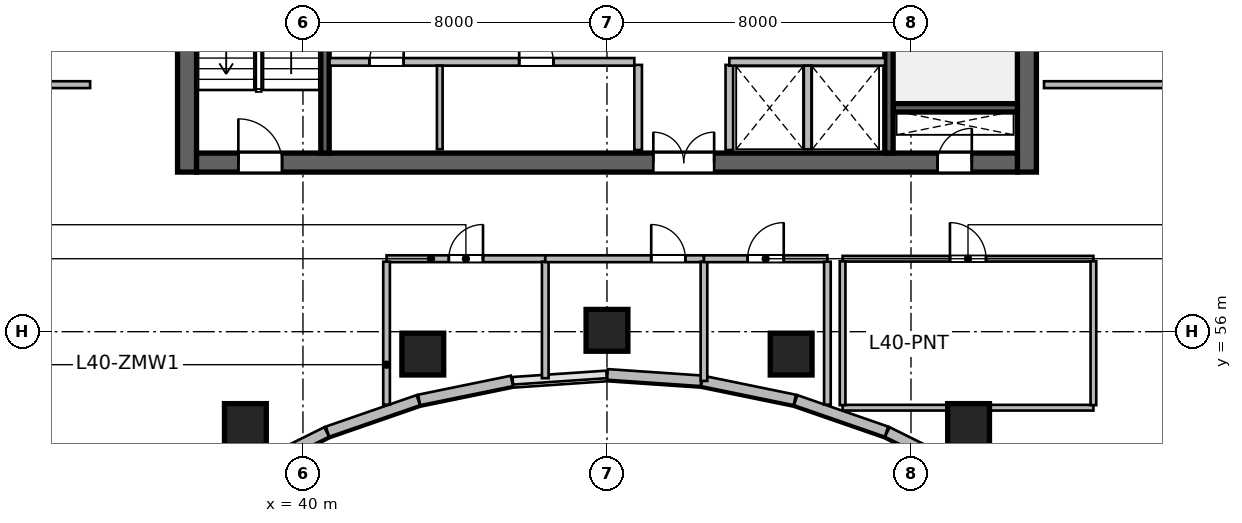
"""IFC4 building model, lengths in metres.
Left out: names, types, materials, properties, quantities, classifications, styles, units other than length and angle.
Written with IfcOpenShell. Run it as: python <this file> out.ifc"""

import sys

from ifc_helpers import new_model, si_unit, direction, frame, frame_2d, origin, origin_2d, place, context, subcontext, project, spatial, rectangle, circle, extrude, source, transform, mapped, element, fill, save


model = new_model("IFC4")
c1 = context("Model", 3, precision=1e-05, world=origin(), true_north=direction((0.0, 1.0)))
c2 = subcontext(c1, "Body", "Model", "MODEL_VIEW")
j1 = project(units=[si_unit("LENGTHUNIT", "METRE"), si_unit("PLANEANGLEUNIT", "RADIAN")], contexts=[c1])
p1 = place(None, origin())
s1 = spatial("IfcSite", under=j1, at=p1, CompositionType="ELEMENT")
p2 = place(p1, origin())
s2 = spatial("IfcBuilding", under=s1, at=p2, CompositionType="ELEMENT")
p3 = place(p2, frame((0.0, 0.0, 166.2)))
s3 = spatial("IfcBuildingStorey", under=s2, at=p3, CompositionType="ELEMENT", Elevation=166.2)
m1 = source(origin(), c2, "Body", "SweptSolid", [
    extrude(rectangle(XDim=12.0, YDim=0.5, at=frame_2d((6.0, 0.0))), origin(), (0.0, 0.0, 1.0), 3.9),
])
for number, where, z_axis, x_axis in (
    (1, (36.95, 60.2, 0.0), (0.0, 0.0, 1.0), (0.0, 1.0, 0.0)),
    (2, (59.05, 60.2, 0.0), (0.0, 0.0, 1.0), (0.0, 1.0, 0.0)),
):
    element("IfcWall", number, at=place(p3, frame(where, z_axis=z_axis, x_axis=x_axis)), inside=s3, PredefinedType="SHEAR", context=c2, shape_type="MappedRepresentation", body=[
        mapped(m1, transform((0.0, 0.0, 0.0), scale=1.0)),
    ])
m2 = source(origin(), c2, "Body", "SweptSolid", [
    extrude(rectangle(XDim=21.6, YDim=0.5, at=frame_2d((10.8, 0.0))), origin(), (0.0, 0.0, 1.0), 3.9),
])
p4 = place(p3, frame((37.2, 60.45, 0.0), z_axis=(0.0, 0.0, 1.0), x_axis=(1.0, 0.0, 0.0)))
e3 = element("IfcWall", 3, at=p4, inside=s3, PredefinedType="SHEAR", context=c2, shape_type="MappedRepresentation", body=[
    mapped(m2, transform((0.0, 0.0, 0.0), scale=1.0)),
])
p5 = place(p4, frame((1.1, 0.0, 0.0)))
e4 = element("IfcOpeningElement", 4, at=p5, cuts=e3, PredefinedType="OPENING", context=c2, shape_type="SweptSolid", body=[
    extrude(rectangle(XDim=1.15, YDim=2.15, at=frame_2d((0.575, 1.075))), frame((0.0, 0.26, 0.0), z_axis=(0.0, -1.0, 0.0), x_axis=(1.0, 0.0, 0.0)), (0.0, 0.0, 1.0), 0.52),
])
p6 = place(p4, frame((19.5, 0.0, 0.0)))
e5 = element("IfcOpeningElement", 5, at=p6, cuts=e3, PredefinedType="OPENING", context=c2, shape_type="SweptSolid", body=[
    extrude(rectangle(XDim=0.9, YDim=2.1, at=frame_2d((0.45, 1.05))), frame((0.0, 0.26, 0.0), z_axis=(0.0, -1.0, 0.0), x_axis=(1.0, 0.0, 0.0)), (0.0, 0.0, 1.0), 0.52),
])
p7 = place(p4, frame((12.02, 0.0, 0.0)))
e6 = element("IfcOpeningElement", 6, at=p7, cuts=e3, PredefinedType="OPENING", context=c2, shape_type="SweptSolid", body=[
    extrude(rectangle(XDim=1.6, YDim=2.15, at=frame_2d((0.8, 1.075))), frame((0.0, 0.26, 0.0), z_axis=(0.0, -1.0, 0.0), x_axis=(1.0, 0.0, 0.0)), (0.0, 0.0, 1.0), 0.52),
])
m3 = source(origin(), c2, "Body", "SweptSolid", [
    extrude(rectangle(XDim=3.27, YDim=0.22, at=frame_2d((1.635, 0.0))), origin(), (0.0, 0.0, 1.0), 3.9),
])
p8 = place(p3, frame((55.53, 61.89, 0.0), z_axis=(0.0, 0.0, 1.0), x_axis=(1.0, 0.0, 0.0)))
e7 = element("IfcWall", 7, at=p8, inside=s3, PredefinedType="SHEAR", context=c2, shape_type="MappedRepresentation", body=[
    mapped(m3, transform((0.0, 0.0, 0.0), scale=1.0)),
])
m4 = source(origin(), c2, "Body", "SweptSolid", [
    extrude(rectangle(XDim=11.0, YDim=0.22, at=frame_2d((5.5, 0.0))), origin(), (0.0, 0.0, 1.0), 3.9),
])
p9 = place(p3, frame((40.58, 60.7, 0.0), z_axis=(0.0, 0.0, 1.0), x_axis=(0.0, 1.0, 0.0)))
e8 = element("IfcWall", 8, at=p9, inside=s3, PredefinedType="SHEAR", context=c2, shape_type="MappedRepresentation", body=[
    mapped(m4, transform((0.0, 0.0, 0.0), scale=1.0)),
])
p10 = place(p3, frame((55.42, 60.7, 0.0), z_axis=(0.0, 0.0, 1.0), x_axis=(0.0, 1.0, 0.0)))
e9 = element("IfcWall", 9, at=p10, inside=s3, PredefinedType="SHEAR", context=c2, shape_type="MappedRepresentation", body=[
    mapped(m4, transform((0.0, 0.0, 0.0), scale=1.0)),
])
p11 = place(p10, frame((9.545, 0.0, 0.0)))
e10 = element("IfcOpeningElement", 10, at=p11, cuts=e9, PredefinedType="OPENING", context=c2, shape_type="SweptSolid", body=[
    extrude(rectangle(XDim=1.15, YDim=2.15, at=frame_2d((0.575, 1.075))), frame((0.0, 0.12, 0.0), z_axis=(0.0, -1.0, 0.0), x_axis=(1.0, 0.0, 0.0)), (0.0, 0.0, 1.0), 0.24),
])
m5 = source(origin(), c2, "Body", "SweptSolid", [
    extrude(circle(Radius=0.55, at=origin_2d()), origin(), (0.0, 0.0, 1.0), 3.9),
])
for number, where, z_axis, x_axis in (
    (11, (38.485, 53.558, 0.0), (0.0, 0.0, 1.0), (-0.289, 0.957, 0.0)),
    (12, (43.154, 55.411, 0.0), (0.0, 0.0, 1.0), (-0.143, 0.99, 0.0)),
    (13, (48.0, 56.036, 0.0), (0.0, 0.0, 1.0), (0.0, 1.0, 0.0)),
    (14, (52.846, 55.411, 0.0), (0.0, 0.0, 1.0), (0.143, 0.99, 0.0)),
    (15, (57.515, 53.558, 0.0), (0.0, 0.0, 1.0), (0.289, 0.957, 0.0)),
):
    element("IfcColumn", number, at=place(p3, frame(where, z_axis=z_axis, x_axis=x_axis)), inside=s3, PredefinedType="COLUMN", context=c2, shape_type="MappedRepresentation", body=[
        mapped(m5, transform((0.0, 0.0, 0.0), scale=1.0)),
    ])
m6 = source(origin(), c2, "Body", "SweptSolid", [
    extrude(rectangle(XDim=2.584, YDim=0.28, at=frame_2d((1.292, 0.0))), origin(), (0.0, 0.0, 1.0), 3.65),
])
p12 = place(p3, frame((57.692, 52.213, 0.0), z_axis=(0.0, 0.0, 1.0), x_axis=(-0.895989792847, 0.44407464588, 0.0)))
e16 = element("IfcWall", 16, at=p12, inside=s3, PredefinedType="SOLIDWALL", context=c2, shape_type="MappedRepresentation", body=[
    mapped(m6, transform((0.0, 0.0, 0.0), scale=1.0)),
])
m7 = source(origin(), c2, "Body", "SweptSolid", [
    extrude(rectangle(XDim=2.53, YDim=0.28, at=frame_2d((1.265, 0.0))), origin(), (0.0, 0.0, 1.0), 3.65),
])
p13 = place(p3, frame((55.355, 53.37, 0.0), z_axis=(0.0, 0.0, 1.0), x_axis=(-0.944872429646, 0.327438683872, 0.0)))
e17 = element("IfcWall", 17, at=p13, inside=s3, PredefinedType="SOLIDWALL", context=c2, shape_type="MappedRepresentation", body=[
    mapped(m7, transform((0.0, 0.0, 0.0), scale=1.0)),
])
m8 = source(origin(), c2, "Body", "SweptSolid", [
    extrude(rectangle(XDim=2.491, YDim=0.28, at=frame_2d((1.246, 0.0))), origin(), (0.0, 0.0, 1.0), 3.65),
])
p14 = place(p3, frame((52.942, 54.205, 0.0), z_axis=(0.0, 0.0, 1.0), x_axis=(-0.979630885979, 0.200806691214, 0.0)))
e18 = element("IfcWall", 18, at=p14, inside=s3, PredefinedType="SOLIDWALL", context=c2, shape_type="MappedRepresentation", body=[
    mapped(m8, transform((0.0, 0.0, 0.0), scale=1.0)),
])
m9 = source(origin(), c2, "Body", "SweptSolid", [
    extrude(rectangle(XDim=2.471, YDim=0.28, at=frame_2d((1.236, 0.0))), origin(), (0.0, 0.0, 1.0), 3.65),
])
p15 = place(p3, frame((50.478, 54.708, 0.0), z_axis=(0.0, 0.0, 1.0), x_axis=(-0.997708006929, 0.067666335123, 0.0)))
e19 = element("IfcWall", 19, at=p15, inside=s3, PredefinedType="SOLIDWALL", context=c2, shape_type="MappedRepresentation", body=[
    mapped(m9, transform((0.0, 0.0, 0.0), scale=1.0)),
])
p16 = place(p3, frame((45.498, 54.705, 0.0), z_axis=(0.0, 0.0, 1.0), x_axis=(-0.979630885979, -0.200806691214, 0.0)))
e20 = element("IfcWall", 20, at=p16, inside=s3, PredefinedType="SOLIDWALL", context=c2, shape_type="MappedRepresentation", body=[
    mapped(m8, transform((0.0, 0.0, 0.0), scale=1.0)),
])
p17 = place(p3, frame((43.035, 54.198, 0.0), z_axis=(0.0, 0.0, 1.0), x_axis=(-0.944872429646, -0.327438683872, 0.0)))
e21 = element("IfcWall", 21, at=p17, inside=s3, PredefinedType="SOLIDWALL", context=c2, shape_type="MappedRepresentation", body=[
    mapped(m7, transform((0.0, 0.0, 0.0), scale=1.0)),
])
p18 = place(p3, frame((40.624, 53.361, 0.0), z_axis=(0.0, 0.0, 1.0), x_axis=(-0.895989792847, -0.44407464588, 0.0)))
e22 = element("IfcWall", 22, at=p18, inside=s3, PredefinedType="SOLIDWALL", context=c2, shape_type="MappedRepresentation", body=[
    mapped(m6, transform((0.0, 0.0, 0.0), scale=1.0)),
])
m10 = source(origin(), c2, "Body", "SweptSolid", [
    extrude(rectangle(XDim=2.24, YDim=0.2, at=frame_2d((1.12, 0.0))), origin(), (0.0, 0.0, 1.0), 3.65),
])
for number, where, z_axis, x_axis in (
    (23, (48.82, 60.78, 0.0), (0.0, 0.0, 1.0), (0.0, 1.0, 0.0)),
    (24, (51.22, 60.78, 0.0), (0.0, 0.0, 1.0), (0.0, 1.0, 0.0)),
):
    element("IfcWall", number, at=place(p3, frame(where, z_axis=z_axis, x_axis=x_axis)), inside=s3, PredefinedType="SOLIDWALL", context=c2, shape_type="MappedRepresentation", body=[
        mapped(m10, transform((0.0, 0.0, 0.0), scale=1.0)),
    ])
m11 = source(origin(), c2, "Body", "SweptSolid", [
    extrude(rectangle(XDim=8.02, YDim=0.2, at=frame_2d((4.01, 0.0))), origin(), (0.0, 0.0, 1.0), 3.65),
])
p19 = place(p3, frame((40.7, 63.1, 0.0), z_axis=(0.0, 0.0, 1.0), x_axis=(1.0, 0.0, 0.0)))
e25 = element("IfcWall", 25, at=p19, inside=s3, PredefinedType="SOLIDWALL", context=c2, shape_type="MappedRepresentation", body=[
    mapped(m11, transform((0.0, 0.0, 0.0), scale=1.0)),
])
p20 = place(p19, frame((1.05, 0.0, 0.0)))
e26 = element("IfcOpeningElement", 26, at=p20, cuts=e25, PredefinedType="OPENING", context=c2, shape_type="SweptSolid", body=[
    extrude(rectangle(XDim=0.9, YDim=2.1, at=frame_2d((0.45, 1.05))), frame((0.0, 0.11, 0.0), z_axis=(0.0, -1.0, 0.0), x_axis=(1.0, 0.0, 0.0)), (0.0, 0.0, 1.0), 0.22),
])
p21 = place(p19, frame((4.99, 0.0, 0.0)))
e27 = element("IfcOpeningElement", 27, at=p21, cuts=e25, PredefinedType="OPENING", context=c2, shape_type="SweptSolid", body=[
    extrude(rectangle(XDim=0.9, YDim=2.1, at=frame_2d((0.45, 1.05))), frame((0.0, 0.11, 0.0), z_axis=(0.0, -1.0, 0.0), x_axis=(1.0, 0.0, 0.0)), (0.0, 0.0, 1.0), 0.22),
])
m12 = source(origin(), c2, "Body", "SweptSolid", [
    extrude(rectangle(XDim=4.1, YDim=0.2, at=frame_2d((2.05, 0.0))), origin(), (0.0, 0.0, 1.0), 3.65),
])
p22 = place(p3, frame((51.22, 63.1, 0.0), z_axis=(0.0, 0.0, 1.0), x_axis=(1.0, 0.0, 0.0)))
e28 = element("IfcWall", 28, at=p22, inside=s3, PredefinedType="SOLIDWALL", context=c2, shape_type="MappedRepresentation", body=[
    mapped(m12, transform((0.0, 0.0, 0.0), scale=1.0)),
])
m13 = source(origin(), c2, "Body", "SweptSolid", [
    extrude(rectangle(XDim=2.2, YDim=0.15, at=frame_2d((1.1, 0.0))), origin(), (0.0, 0.0, 1.0), 3.65),
])
p23 = place(p3, frame((43.6, 60.8, 0.0), z_axis=(0.0, 0.0, 1.0), x_axis=(0.0, 1.0, 0.0)))
e29 = element("IfcWall", 29, at=p23, inside=s3, PredefinedType="PARTITIONING", context=c2, shape_type="MappedRepresentation", body=[
    mapped(m13, transform((0.0, 0.0, 0.0), scale=1.0)),
])
m14 = source(origin(), c2, "Body", "SweptSolid", [
    extrude(rectangle(XDim=2.2, YDim=0.2, at=frame_2d((1.1, 0.0))), origin(), (0.0, 0.0, 1.0), 3.65),
])
p24 = place(p3, frame((53.28, 60.8, 0.0), z_axis=(0.0, 0.0, 1.0), x_axis=(0.0, 1.0, 0.0)))
e30 = element("IfcWall", 30, at=p24, inside=s3, PredefinedType="SOLIDWALL", context=c2, shape_type="MappedRepresentation", body=[
    mapped(m14, transform((0.0, 0.0, 0.0), scale=1.0)),
])
m15 = source(origin(), c2, "Body", "SweptSolid", [
    extrude(rectangle(XDim=4.176, YDim=0.18, at=frame_2d((2.088, 0.0))), origin(), (0.0, 0.0, 1.0), 3.65),
])
p25 = place(p3, frame((42.2, 57.92, 0.0), z_axis=(0.0, 0.0, 1.0), x_axis=(1.0, 0.0, 0.0)))
e31 = element("IfcWall", 31, at=p25, inside=s3, PredefinedType="PLUMBINGWALL", context=c2, shape_type="MappedRepresentation", body=[
    mapped(m15, transform((0.0, 0.0, 0.0), scale=1.0)),
])
p26 = place(p25, frame((1.638, 0.0, 0.0)))
e32 = element("IfcOpeningElement", 32, at=p26, cuts=e31, PredefinedType="OPENING", context=c2, shape_type="SweptSolid", body=[
    extrude(rectangle(XDim=0.9, YDim=2.08, at=frame_2d((0.45, 1.04))), frame((0.0, 0.1, 0.0), z_axis=(0.0, -1.0, 0.0), x_axis=(1.0, 0.0, 0.0)), (0.0, 0.0, 1.0), 0.2),
])
m16 = source(origin(), c2, "Body", "SweptSolid", [
    extrude(rectangle(XDim=3.763, YDim=0.175, at=frame_2d((1.881, 0.0))), origin(), (0.0, 0.0, 1.0), 3.65),
])
p27 = place(p3, frame((42.2, 54.079, 0.0), z_axis=(0.0, 0.0, 1.0), x_axis=(0.0, 1.0, 0.0)))
e33 = element("IfcWall", 33, at=p27, inside=s3, PredefinedType="PARTITIONING", context=c2, shape_type="MappedRepresentation", body=[
    mapped(m16, transform((0.0, 0.0, 0.0), scale=1.0)),
])
m17 = source(origin(), c2, "Body", "SweptSolid", [
    extrude(rectangle(XDim=3.065, YDim=0.175, at=frame_2d((1.533, 0.0))), origin(), (0.0, 0.0, 1.0), 3.65),
])
p28 = place(p3, frame((46.376, 54.776, 0.0), z_axis=(0.0, 0.0, 1.0), x_axis=(0.0, 1.0, 0.0)))
e34 = element("IfcWall", 34, at=p28, inside=s3, PredefinedType="PARTITIONING", context=c2, shape_type="MappedRepresentation", body=[
    mapped(m17, transform((0.0, 0.0, 0.0), scale=1.0)),
])
p29 = place(p3, frame((46.376, 57.92, 0.0), z_axis=(0.0, 0.0, 1.0), x_axis=(1.0, 0.0, 0.0)))
e35 = element("IfcWall", 35, at=p29, inside=s3, PredefinedType="PLUMBINGWALL", context=c2, shape_type="MappedRepresentation", body=[
    mapped(m15, transform((0.0, 0.0, 0.0), scale=1.0)),
])
p30 = place(p29, frame((2.788, 0.0, 0.0)))
e36 = element("IfcOpeningElement", 36, at=p30, cuts=e35, PredefinedType="OPENING", context=c2, shape_type="SweptSolid", body=[
    extrude(rectangle(XDim=0.9, YDim=2.08, at=frame_2d((0.45, 1.04))), frame((0.0, 0.1, 0.0), z_axis=(0.0, -1.0, 0.0), x_axis=(1.0, 0.0, 0.0)), (0.0, 0.0, 1.0), 0.2),
])
m18 = source(origin(), c2, "Body", "SweptSolid", [
    extrude(rectangle(XDim=3.136, YDim=0.175, at=frame_2d((1.568, 0.0))), origin(), (0.0, 0.0, 1.0), 3.65),
])
p31 = place(p3, frame((50.552, 54.705, 0.0), z_axis=(0.0, 0.0, 1.0), x_axis=(0.0, 1.0, 0.0)))
e37 = element("IfcWall", 37, at=p31, inside=s3, PredefinedType="PARTITIONING", context=c2, shape_type="MappedRepresentation", body=[
    mapped(m18, transform((0.0, 0.0, 0.0), scale=1.0)),
])
m19 = source(origin(), c2, "Body", "SweptSolid", [
    extrude(rectangle(XDim=3.248, YDim=0.18, at=frame_2d((1.624, 0.0))), origin(), (0.0, 0.0, 1.0), 3.65),
])
p32 = place(p3, frame((50.552, 57.92, 0.0), z_axis=(0.0, 0.0, 1.0), x_axis=(1.0, 0.0, 0.0)))
e38 = element("IfcWall", 38, at=p32, inside=s3, PredefinedType="PLUMBINGWALL", context=c2, shape_type="MappedRepresentation", body=[
    mapped(m19, transform((0.0, 0.0, 0.0), scale=1.0)),
])
p33 = place(p32, frame((1.149, 0.0, 0.0)))
e39 = element("IfcOpeningElement", 39, at=p33, cuts=e38, PredefinedType="OPENING", context=c2, shape_type="SweptSolid", body=[
    extrude(rectangle(XDim=0.95, YDim=2.12, at=frame_2d((0.475, 1.06))), frame((0.0, 0.1, 0.0), z_axis=(0.0, -1.0, 0.0), x_axis=(1.0, 0.0, 0.0)), (0.0, 0.0, 1.0), 0.2),
])
p34 = place(p3, frame((53.8, 54.079, 0.0), z_axis=(0.0, 0.0, 1.0), x_axis=(0.0, 1.0, 0.0)))
e40 = element("IfcWall", 40, at=p34, inside=s3, PredefinedType="PARTITIONING", context=c2, shape_type="MappedRepresentation", body=[
    mapped(m16, transform((0.0, 0.0, 0.0), scale=1.0)),
])
m20 = source(origin(), c2, "Body", "SweptSolid", [
    extrude(rectangle(XDim=6.6, YDim=0.15, at=frame_2d((3.3, 0.0))), origin(), (0.0, 0.0, 1.0), 3.095),
])
p35 = place(p3, frame((54.2, 54.0, 0.0), z_axis=(0.0, 0.0, 1.0), x_axis=(1.0, 0.0, 0.0)))
e41 = element("IfcWall", 41, at=p35, inside=s3, PredefinedType="PARTITIONING", context=c2, shape_type="MappedRepresentation", body=[
    mapped(m20, transform((0.0, 0.0, 0.0), scale=1.0)),
])
m21 = source(origin(), c2, "Body", "SweptSolid", [
    extrude(rectangle(XDim=6.6, YDim=0.15, at=frame_2d((3.3, 0.0))), origin(), (0.0, 0.0, 1.0), 3.65),
])
p36 = place(p3, frame((54.2, 57.92, 0.0), z_axis=(0.0, 0.0, 1.0), x_axis=(1.0, 0.0, 0.0)))
e42 = element("IfcWall", 42, at=p36, inside=s3, PredefinedType="PARTITIONING", context=c2, shape_type="MappedRepresentation", body=[
    mapped(m21, transform((0.0, 0.0, 0.0), scale=1.0)),
])
p37 = place(p36, frame((2.825, 0.0, 0.0)))
e43 = element("IfcOpeningElement", 43, at=p37, cuts=e42, PredefinedType="OPENING", context=c2, shape_type="SweptSolid", body=[
    extrude(rectangle(XDim=0.95, YDim=2.1, at=frame_2d((0.475, 1.05))), frame((0.0, 0.085, 0.0), z_axis=(0.0, -1.0, 0.0), x_axis=(1.0, 0.0, 0.0)), (0.0, 0.0, 1.0), 0.17),
])
m22 = source(origin(), c2, "Body", "SweptSolid", [
    extrude(rectangle(XDim=3.785, YDim=0.15, at=frame_2d((1.893, 0.0))), origin(), (0.0, 0.0, 1.0), 3.65),
])
for number, where, z_axis, x_axis in (
    (44, (54.2, 54.067, 0.0), (0.0, 0.0, 1.0), (0.0, 1.0, 0.0)),
    (45, (60.8, 54.067, 0.0), (0.0, 0.0, 1.0), (0.0, 1.0, 0.0)),
):
    element("IfcWall", number, at=place(p3, frame(where, z_axis=z_axis, x_axis=x_axis)), inside=s3, PredefinedType="PARTITIONING", context=c2, shape_type="MappedRepresentation", body=[
        mapped(m22, transform((0.0, 0.0, 0.0), scale=1.0)),
    ])
m23 = source(origin(), c2, "Body", "SweptSolid", [
    extrude(rectangle(XDim=2.86, YDim=0.18, at=frame_2d((1.43, 0.0))), origin(), (0.0, 0.0, 1.0), 3.65),
])
p38 = place(p3, frame((31.54, 62.5, 0.0), z_axis=(0.0, 0.0, 1.0), x_axis=(1.0, 0.0, 0.0)))
e46 = element("IfcWall", 46, at=p38, inside=s3, PredefinedType="PLUMBINGWALL", context=c2, shape_type="MappedRepresentation", body=[
    mapped(m23, transform((0.0, 0.0, 0.0), scale=1.0)),
])
m24 = source(origin(), c2, "Body", "SweptSolid", [
    extrude(rectangle(XDim=4.96, YDim=0.18, at=frame_2d((2.48, 0.0))), origin(), (0.0, 0.0, 1.0), 3.65),
])
p39 = place(p3, frame((59.5, 62.5, 0.0), z_axis=(0.0, 0.0, 1.0), x_axis=(1.0, 0.0, 0.0)))
e47 = element("IfcWall", 47, at=p39, inside=s3, PredefinedType="PLUMBINGWALL", context=c2, shape_type="MappedRepresentation", body=[
    mapped(m24, transform((0.0, 0.0, 0.0), scale=1.0)),
])
m25 = source(origin(), c2, "Body", "SweptSolid", [
    extrude(rectangle(XDim=1.15, YDim=2.15, at=frame_2d((0.575, 1.075))), frame((0.0, 0.025, 0.0), z_axis=(0.0, -1.0, 0.0), x_axis=(1.0, 0.0, 0.0)), (0.0, 0.0, 1.0), 0.05),
])
p40 = place(p5, origin())
e48 = element("IfcDoor", 48, at=p40, inside=s3, OperationType="SINGLE_SWING_LEFT", PredefinedType="DOOR", context=c2, shape_type="MappedRepresentation", body=[
    mapped(m25, transform((0.0, 0.0, 0.0), scale=1.0)),
])
fill(e4, e48)
m26 = source(origin(), c2, "Body", "SweptSolid", [
    extrude(rectangle(XDim=0.9, YDim=2.1, at=frame_2d((0.45, 1.05))), frame((0.0, 0.025, 0.0), z_axis=(0.0, -1.0, 0.0), x_axis=(1.0, 0.0, 0.0)), (0.0, 0.0, 1.0), 0.05),
])
p41 = place(p6, origin())
e49 = element("IfcDoor", 49, at=p41, inside=s3, OperationType="SINGLE_SWING_RIGHT", PredefinedType="DOOR", context=c2, shape_type="MappedRepresentation", body=[
    mapped(m26, transform((0.0, 0.0, 0.0), scale=1.0)),
])
fill(e5, e49)
m27 = source(origin(), c2, "Body", "SweptSolid", [
    extrude(rectangle(XDim=1.6, YDim=2.15, at=frame_2d((0.8, 1.075))), frame((0.0, 0.025, 0.0), z_axis=(0.0, -1.0, 0.0), x_axis=(1.0, 0.0, 0.0)), (0.0, 0.0, 1.0), 0.05),
])
p42 = place(p7, origin())
e50 = element("IfcDoor", 50, at=p42, inside=s3, OperationType="DOUBLE_DOOR_SINGLE_SWING", PredefinedType="DOOR", context=c2, shape_type="MappedRepresentation", body=[
    mapped(m27, transform((0.0, 0.0, 0.0), scale=1.0)),
])
fill(e6, e50)
p43 = place(p20, origin())
e51 = element("IfcDoor", 51, at=p43, inside=s3, OperationType="SINGLE_SWING_RIGHT", PredefinedType="DOOR", context=c2, shape_type="MappedRepresentation", body=[
    mapped(m26, transform((0.0, 0.0, 0.0), scale=1.0)),
])
fill(e26, e51)
p44 = place(p21, origin())
e52 = element("IfcDoor", 52, at=p44, inside=s3, OperationType="SINGLE_SWING_LEFT", PredefinedType="DOOR", context=c2, shape_type="MappedRepresentation", body=[
    mapped(m26, transform((0.0, 0.0, 0.0), scale=1.0)),
])
fill(e27, e52)
m28 = source(origin(), c2, "Body", "SweptSolid", [
    extrude(rectangle(XDim=0.9, YDim=2.08, at=frame_2d((0.45, 1.04))), frame((0.0, 0.025, 0.0), z_axis=(0.0, -1.0, 0.0), x_axis=(1.0, 0.0, 0.0)), (0.0, 0.0, 1.0), 0.05),
])
p45 = place(p26, origin())
e53 = element("IfcDoor", 53, at=p45, inside=s3, OperationType="SINGLE_SWING_RIGHT", PredefinedType="DOOR", context=c2, shape_type="MappedRepresentation", body=[
    mapped(m28, transform((0.0, 0.0, 0.0), scale=1.0)),
])
fill(e32, e53)
p46 = place(p30, origin())
e54 = element("IfcDoor", 54, at=p46, inside=s3, OperationType="SINGLE_SWING_LEFT", PredefinedType="DOOR", context=c2, shape_type="MappedRepresentation", body=[
    mapped(m28, transform((0.0, 0.0, 0.0), scale=1.0)),
])
fill(e36, e54)
m29 = source(origin(), c2, "Body", "SweptSolid", [
    extrude(rectangle(XDim=0.95, YDim=2.12, at=frame_2d((0.475, 1.06))), frame((0.0, 0.025, 0.0), z_axis=(0.0, -1.0, 0.0), x_axis=(1.0, 0.0, 0.0)), (0.0, 0.0, 1.0), 0.05),
])
p47 = place(p33, origin())
e55 = element("IfcDoor", 55, at=p47, inside=s3, OperationType="SINGLE_SWING_RIGHT", PredefinedType="DOOR", context=c2, shape_type="MappedRepresentation", body=[
    mapped(m29, transform((0.0, 0.0, 0.0), scale=1.0)),
])
fill(e39, e55)
m30 = source(origin(), c2, "Body", "SweptSolid", [
    extrude(rectangle(XDim=0.95, YDim=2.1, at=frame_2d((0.475, 1.05))), frame((0.0, 0.025, 0.0), z_axis=(0.0, -1.0, 0.0), x_axis=(1.0, 0.0, 0.0)), (0.0, 0.0, 1.0), 0.05),
])
p48 = place(p37, origin())
e56 = element("IfcDoor", 56, at=p48, inside=s3, OperationType="SINGLE_SWING_LEFT", PredefinedType="DOOR", context=c2, shape_type="MappedRepresentation", body=[
    mapped(m30, transform((0.0, 0.0, 0.0), scale=1.0)),
])
fill(e43, e56)
save(model, sys.argv[1])
